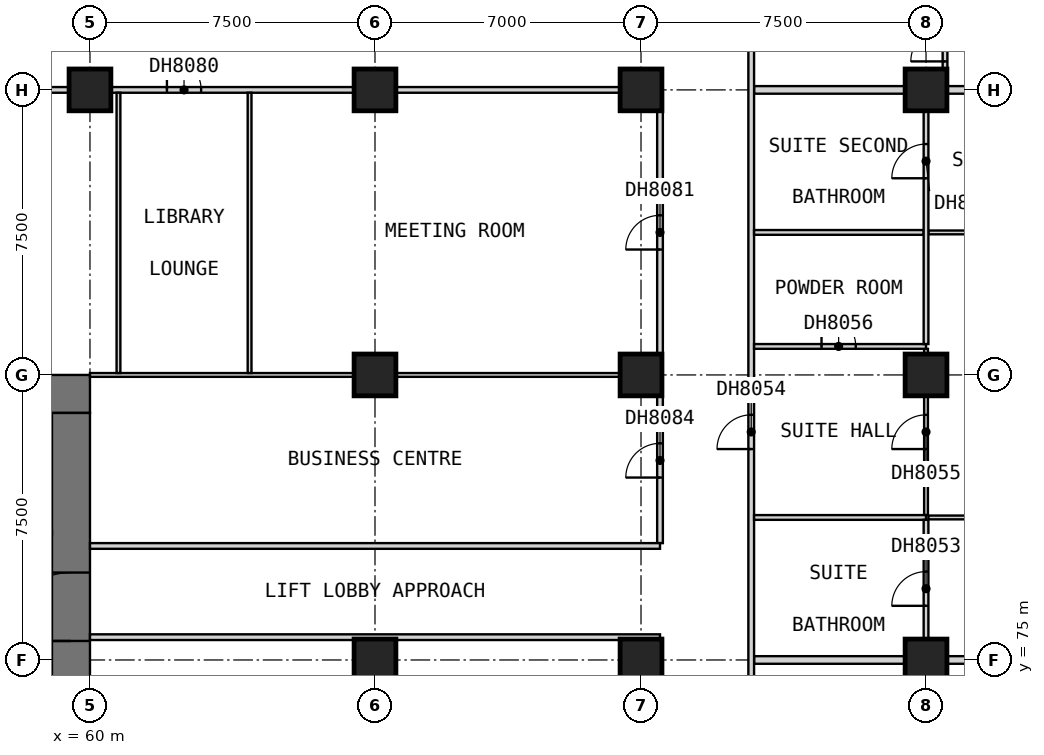
"""IFC4 building model, lengths in metres.
Left out: names, types, materials, properties, quantities, classifications, styles, units other than length and angle.
Written with IfcOpenShell. Run it as: python <this file> out.ifc"""

import sys

from ifc_helpers import new_model, si_unit, direction, frame, frame_2d, origin, origin_2d, place, context, subcontext, project, spatial, rectangle, extrude, element, fill, save


model = new_model("IFC4")
c1 = context("Model", 3, precision=1e-05, world=origin(), true_north=direction((0.0, 1.0)))
c2 = subcontext(c1, "Body", "Model", "MODEL_VIEW")
j1 = project(units=[si_unit("LENGTHUNIT", "METRE"), si_unit("PLANEANGLEUNIT", "RADIAN")], contexts=[c1])
p1 = place(None, origin())
s1 = spatial("IfcSite", under=j1, at=p1, CompositionType="ELEMENT")
p2 = place(p1, origin())
s2 = spatial("IfcBuilding", under=s1, at=p2, CompositionType="ELEMENT")
p3 = place(p2, frame((0.0, 0.0, 89.9)))
s3 = spatial("IfcBuildingStorey", under=s2, at=p3, CompositionType="ELEMENT", Elevation=89.9)
for number, where, z_axis, x_axis in (
    (1, (60.0, 90.0, 0.0), (0.0, 0.0, 1.0), (1.0, 0.0, 0.0)),
    (2, (67.5, 75.0, 0.0), (0.0, 0.0, 1.0), (1.0, 0.0, 0.0)),
    (3, (67.5, 82.5, 0.0), (0.0, 0.0, 1.0), (1.0, 0.0, 0.0)),
    (4, (67.5, 90.0, 0.0), (0.0, 0.0, 1.0), (1.0, 0.0, 0.0)),
    (5, (74.5, 75.0, 0.0), (0.0, 0.0, 1.0), (1.0, 0.0, 0.0)),
    (6, (74.5, 82.5, 0.0), (0.0, 0.0, 1.0), (1.0, 0.0, 0.0)),
    (7, (74.5, 90.0, 0.0), (0.0, 0.0, 1.0), (1.0, 0.0, 0.0)),
    (8, (82.0, 75.0, 0.0), (0.0, 0.0, 1.0), (1.0, 0.0, 0.0)),
    (9, (82.0, 82.5, 0.0), (0.0, 0.0, 1.0), (1.0, 0.0, 0.0)),
    (10, (82.0, 90.0, 0.0), (0.0, 0.0, 1.0), (1.0, 0.0, 0.0)),
):
    element("IfcColumn", number, at=place(p3, frame(where, z_axis=z_axis, x_axis=x_axis)), inside=s3, PredefinedType="COLUMN", context=c2, shape_type="SweptSolid", body=[
        extrude(rectangle(XDim=1.1, YDim=1.1, at=origin_2d()), origin(), (0.0, 0.0, 1.0), 3.6),
    ])
p4 = place(p3, frame((30.0, 82.0, 0.0), z_axis=(0.0, 0.0, 1.0), x_axis=(1.0, 0.0, 0.0)))
e11 = element("IfcWall", 11, at=p4, inside=s3, PredefinedType="SHEAR", context=c2, shape_type="SweptSolid", body=[
    extrude(rectangle(XDim=30.0, YDim=1.0, at=frame_2d((15.0, 0.0))), origin(), (0.0, 0.0, 1.0), 3.6),
])
p5 = place(p3, frame((59.5, 61.0, 0.0), z_axis=(0.0, 0.0, 1.0), x_axis=(0.0, 1.0, 0.0)))
e12 = element("IfcWall", 12, at=p5, inside=s3, PredefinedType="SHEAR", context=c2, shape_type="SweptSolid", body=[
    extrude(rectangle(XDim=20.5, YDim=1.0, at=frame_2d((10.25, 0.0))), origin(), (0.0, 0.0, 1.0), 3.6),
])
p6 = place(p5, frame((14.5, 0.0, 0.0)))
e13 = element("IfcOpeningElement", 13, at=p6, cuts=e12, PredefinedType="OPENING", context=c2, shape_type="SweptSolid", body=[
    extrude(rectangle(XDim=1.8, YDim=2.1, at=frame_2d((0.9, 1.05))), frame((0.0, 0.51, 0.0), z_axis=(0.0, -1.0, 0.0), x_axis=(1.0, 0.0, 0.0)), (0.0, 0.0, 1.0), 1.02),
])
for number, where, z_axis, x_axis in (
    (14, (77.475, 75.0, 0.0), (0.0, 0.0, 1.0), (1.0, 0.0, 0.0)),
    (15, (77.475, 90.0, 0.0), (0.0, 0.0, 1.0), (1.0, 0.0, 0.0)),
):
    element("IfcWall", number, at=place(p3, frame(where, z_axis=z_axis, x_axis=x_axis)), inside=s3, PredefinedType="PARTITIONING", context=c2, shape_type="SweptSolid", body=[
        extrude(rectangle(XDim=12.525, YDim=0.2, at=frame_2d((6.262, 0.0))), origin(), (0.0, 0.0, 1.0), 3.35),
    ])
p7 = place(p3, frame((33.75, 90.0, 0.0), z_axis=(0.0, 0.0, 1.0), x_axis=(1.0, 0.0, 0.0)))
e16 = element("IfcWall", 16, at=p7, inside=s3, PredefinedType="PARTITIONING", context=c2, shape_type="SweptSolid", body=[
    extrude(rectangle(XDim=41.25, YDim=0.15, at=frame_2d((20.625, 0.0))), origin(), (0.0, 0.0, 1.0), 3.35),
])
p8 = place(p7, frame((1.05, 0.0, 0.0)))
e17 = element("IfcOpeningElement", 17, at=p8, cuts=e16, PredefinedType="OPENING", context=c2, shape_type="SweptSolid", body=[
    extrude(rectangle(XDim=0.9, YDim=2.1, at=frame_2d((0.45, 1.05))), frame((0.0, 0.085, 0.0), z_axis=(0.0, -1.0, 0.0), x_axis=(1.0, 0.0, 0.0)), (0.0, 0.0, 1.0), 0.17),
])
p9 = place(p7, frame((14.55, 0.0, 0.0)))
e18 = element("IfcOpeningElement", 18, at=p9, cuts=e16, PredefinedType="OPENING", context=c2, shape_type="SweptSolid", body=[
    extrude(rectangle(XDim=0.9, YDim=2.1, at=frame_2d((0.45, 1.05))), frame((0.0, 0.085, 0.0), z_axis=(0.0, -1.0, 0.0), x_axis=(1.0, 0.0, 0.0)), (0.0, 0.0, 1.0), 0.17),
])
p10 = place(p7, frame((28.275, 0.0, 0.0)))
e19 = element("IfcOpeningElement", 19, at=p10, cuts=e16, PredefinedType="OPENING", context=c2, shape_type="SweptSolid", body=[
    extrude(rectangle(XDim=0.9, YDim=2.1, at=frame_2d((0.45, 1.05))), frame((0.0, 0.085, 0.0), z_axis=(0.0, -1.0, 0.0), x_axis=(1.0, 0.0, 0.0)), (0.0, 0.0, 1.0), 0.17),
])
p11 = place(p3, frame((75.0, 66.975, 0.0), z_axis=(0.0, 0.0, 1.0), x_axis=(0.0, 1.0, 0.0)))
e20 = element("IfcWall", 20, at=p11, inside=s3, PredefinedType="PARTITIONING", context=c2, shape_type="SweptSolid", body=[
    extrude(rectangle(XDim=8.55, YDim=0.15, at=frame_2d((4.275, 0.0))), origin(), (0.0, 0.0, 1.0), 3.35),
])
p12 = place(p11, frame((3.825, 0.0, 0.0)))
e21 = element("IfcOpeningElement", 21, at=p12, cuts=e20, PredefinedType="OPENING", context=c2, shape_type="SweptSolid", body=[
    extrude(rectangle(XDim=0.9, YDim=2.1, at=frame_2d((0.45, 1.05))), frame((0.0, 0.085, 0.0), z_axis=(0.0, -1.0, 0.0), x_axis=(1.0, 0.0, 0.0)), (0.0, 0.0, 1.0), 0.17),
])
p13 = place(p3, frame((75.0, 78.075, 0.0), z_axis=(0.0, 0.0, 1.0), x_axis=(0.0, 1.0, 0.0)))
e22 = element("IfcWall", 22, at=p13, inside=s3, PredefinedType="PARTITIONING", context=c2, shape_type="SweptSolid", body=[
    extrude(rectangle(XDim=11.85, YDim=0.15, at=frame_2d((5.925, 0.0))), origin(), (0.0, 0.0, 1.0), 3.35),
])
p14 = place(p13, frame((7.725, 0.0, 0.0)))
e23 = element("IfcOpeningElement", 23, at=p14, cuts=e22, PredefinedType="OPENING", context=c2, shape_type="SweptSolid", body=[
    extrude(rectangle(XDim=0.9, YDim=2.1, at=frame_2d((0.45, 1.05))), frame((0.0, 0.085, 0.0), z_axis=(0.0, -1.0, 0.0), x_axis=(1.0, 0.0, 0.0)), (0.0, 0.0, 1.0), 0.17),
])
p15 = place(p13, frame((1.725, 0.0, 0.0)))
e24 = element("IfcOpeningElement", 24, at=p15, cuts=e22, PredefinedType="OPENING", context=c2, shape_type="SweptSolid", body=[
    extrude(rectangle(XDim=0.9, YDim=2.1, at=frame_2d((0.45, 1.05))), frame((0.0, 0.085, 0.0), z_axis=(0.0, -1.0, 0.0), x_axis=(1.0, 0.0, 0.0)), (0.0, 0.0, 1.0), 0.17),
])
p16 = place(p3, frame((77.4, 50.175, 0.0), z_axis=(0.0, 0.0, 1.0), x_axis=(0.0, 1.0, 0.0)))
e25 = element("IfcWall", 25, at=p16, inside=s3, PredefinedType="PARTITIONING", context=c2, shape_type="SweptSolid", body=[
    extrude(rectangle(XDim=42.15, YDim=0.15, at=frame_2d((21.075, 0.0))), origin(), (0.0, 0.0, 1.0), 3.35),
])
p17 = place(p16, frame((7.875, 0.0, 0.0)))
e26 = element("IfcOpeningElement", 26, at=p17, cuts=e25, PredefinedType="OPENING", context=c2, shape_type="SweptSolid", body=[
    extrude(rectangle(XDim=0.9, YDim=2.1, at=frame_2d((0.45, 1.05))), frame((0.0, 0.085, 0.0), z_axis=(0.0, -1.0, 0.0), x_axis=(1.0, 0.0, 0.0)), (0.0, 0.0, 1.0), 0.17),
])
p18 = place(p16, frame((15.375, 0.0, 0.0)))
e27 = element("IfcOpeningElement", 27, at=p18, cuts=e25, PredefinedType="OPENING", context=c2, shape_type="SweptSolid", body=[
    extrude(rectangle(XDim=0.9, YDim=2.1, at=frame_2d((0.45, 1.05))), frame((0.0, 0.085, 0.0), z_axis=(0.0, -1.0, 0.0), x_axis=(1.0, 0.0, 0.0)), (0.0, 0.0, 1.0), 0.17),
])
p19 = place(p16, frame((30.375, 0.0, 0.0)))
e28 = element("IfcOpeningElement", 28, at=p19, cuts=e25, PredefinedType="OPENING", context=c2, shape_type="SweptSolid", body=[
    extrude(rectangle(XDim=0.9, YDim=2.1, at=frame_2d((0.45, 1.05))), frame((0.0, 0.085, 0.0), z_axis=(0.0, -1.0, 0.0), x_axis=(1.0, 0.0, 0.0)), (0.0, 0.0, 1.0), 0.17),
])
p20 = place(p3, frame((82.062, 78.75, 0.0), z_axis=(0.0, 0.0, 1.0), x_axis=(1.0, 0.0, 0.0)))
e29 = element("IfcWall", 29, at=p20, inside=s3, PredefinedType="PARTITIONING", context=c2, shape_type="SweptSolid", body=[
    extrude(rectangle(XDim=7.127, YDim=0.1, at=frame_2d((3.564, 0.0))), origin(), (0.0, 0.0, 1.0), 3.35),
])
p21 = place(p20, frame((3.488, 0.0, 0.0)))
e30 = element("IfcOpeningElement", 30, at=p21, cuts=e29, PredefinedType="OPENING", context=c2, shape_type="SweptSolid", body=[
    extrude(rectangle(XDim=0.9, YDim=2.1, at=frame_2d((0.45, 1.05))), frame((0.0, 0.06, 0.0), z_axis=(0.0, -1.0, 0.0), x_axis=(1.0, 0.0, 0.0)), (0.0, 0.0, 1.0), 0.12),
])
p22 = place(p3, frame((60.0, 82.5, 0.0), z_axis=(0.0, 0.0, 1.0), x_axis=(1.0, 0.0, 0.0)))
e31 = element("IfcWall", 31, at=p22, inside=s3, PredefinedType="PARTITIONING", context=c2, shape_type="SweptSolid", body=[
    extrude(rectangle(XDim=14.925, YDim=0.1, at=frame_2d((7.462, 0.0))), origin(), (0.0, 0.0, 1.0), 3.35),
])
p23 = place(p3, frame((82.062, 86.25, 0.0), z_axis=(0.0, 0.0, 1.0), x_axis=(1.0, 0.0, 0.0)))
e32 = element("IfcWall", 32, at=p23, inside=s3, PredefinedType="PARTITIONING", context=c2, shape_type="SweptSolid", body=[
    extrude(rectangle(XDim=7.127, YDim=0.1, at=frame_2d((3.564, 0.0))), origin(), (0.0, 0.0, 1.0), 3.35),
])
p24 = place(p23, frame((3.488, 0.0, 0.0)))
e33 = element("IfcOpeningElement", 33, at=p24, cuts=e32, PredefinedType="OPENING", context=c2, shape_type="SweptSolid", body=[
    extrude(rectangle(XDim=0.9, YDim=2.1, at=frame_2d((0.45, 1.05))), frame((0.0, 0.06, 0.0), z_axis=(0.0, -1.0, 0.0), x_axis=(1.0, 0.0, 0.0)), (0.0, 0.0, 1.0), 0.12),
])
for number, where, z_axis, x_axis in (
    (34, (60.75, 82.55, 0.0), (0.0, 0.0, 1.0), (0.0, 1.0, 0.0)),
    (35, (64.2, 82.55, 0.0), (0.0, 0.0, 1.0), (0.0, 1.0, 0.0)),
):
    element("IfcWall", number, at=place(p3, frame(where, z_axis=z_axis, x_axis=x_axis)), inside=s3, PredefinedType="PARTITIONING", context=c2, shape_type="SweptSolid", body=[
        extrude(rectangle(XDim=7.375, YDim=0.1, at=frame_2d((3.688, 0.0))), origin(), (0.0, 0.0, 1.0), 3.35),
    ])
p25 = place(p3, frame((82.0, 78.812, 0.0), z_axis=(0.0, 0.0, 1.0), x_axis=(0.0, 1.0, 0.0)))
e36 = element("IfcWall", 36, at=p25, inside=s3, PredefinedType="PARTITIONING", context=c2, shape_type="SweptSolid", body=[
    extrude(rectangle(XDim=4.375, YDim=0.1, at=frame_2d((2.188, 0.0))), origin(), (0.0, 0.0, 1.0), 3.35),
])
p26 = place(p25, frame((1.738, 0.0, 0.0)))
e37 = element("IfcOpeningElement", 37, at=p26, cuts=e36, PredefinedType="OPENING", context=c2, shape_type="SweptSolid", body=[
    extrude(rectangle(XDim=0.9, YDim=2.1, at=frame_2d((0.45, 1.05))), frame((0.0, 0.06, 0.0), z_axis=(0.0, -1.0, 0.0), x_axis=(1.0, 0.0, 0.0)), (0.0, 0.0, 1.0), 0.12),
])
p27 = place(p3, frame((77.475, 78.75, 0.0), z_axis=(0.0, 0.0, 1.0), x_axis=(1.0, 0.0, 0.0)))
e38 = element("IfcWall", 38, at=p27, inside=s3, PredefinedType="PARTITIONING", context=c2, shape_type="SweptSolid", body=[
    extrude(rectangle(XDim=4.525, YDim=0.125, at=frame_2d((2.262, 0.0))), origin(), (0.0, 0.0, 1.0), 3.35),
])
p28 = place(p3, frame((77.475, 83.25, 0.0), z_axis=(0.0, 0.0, 1.0), x_axis=(1.0, 0.0, 0.0)))
e39 = element("IfcWall", 39, at=p28, inside=s3, PredefinedType="PARTITIONING", context=c2, shape_type="SweptSolid", body=[
    extrude(rectangle(XDim=4.525, YDim=0.125, at=frame_2d((2.262, 0.0))), origin(), (0.0, 0.0, 1.0), 3.35),
])
p29 = place(p28, frame((1.775, 0.0, 0.0)))
e40 = element("IfcOpeningElement", 40, at=p29, cuts=e39, PredefinedType="OPENING", context=c2, shape_type="SweptSolid", body=[
    extrude(rectangle(XDim=0.9, YDim=2.1, at=frame_2d((0.45, 1.05))), frame((0.0, 0.073, 0.0), z_axis=(0.0, -1.0, 0.0), x_axis=(1.0, 0.0, 0.0)), (0.0, 0.0, 1.0), 0.145),
])
p30 = place(p3, frame((77.475, 86.25, 0.0), z_axis=(0.0, 0.0, 1.0), x_axis=(1.0, 0.0, 0.0)))
e41 = element("IfcWall", 41, at=p30, inside=s3, PredefinedType="PARTITIONING", context=c2, shape_type="SweptSolid", body=[
    extrude(rectangle(XDim=4.462, YDim=0.125, at=frame_2d((2.231, 0.0))), origin(), (0.0, 0.0, 1.0), 3.35),
])
p31 = place(p3, frame((82.0, 68.312, 0.0), z_axis=(0.0, 0.0, 1.0), x_axis=(0.0, 1.0, 0.0)))
e42 = element("IfcWall", 42, at=p31, inside=s3, PredefinedType="PARTITIONING", context=c2, shape_type="SweptSolid", body=[
    extrude(rectangle(XDim=10.375, YDim=0.125, at=frame_2d((5.188, 0.0))), origin(), (0.0, 0.0, 1.0), 3.35),
])
p32 = place(p31, frame((4.363, 0.0, 0.0)))
e43 = element("IfcOpeningElement", 43, at=p32, cuts=e42, PredefinedType="OPENING", context=c2, shape_type="SweptSolid", body=[
    extrude(rectangle(XDim=0.9, YDim=2.1, at=frame_2d((0.45, 1.05))), frame((0.0, 0.073, 0.0), z_axis=(0.0, -1.0, 0.0), x_axis=(1.0, 0.0, 0.0)), (0.0, 0.0, 1.0), 0.145),
])
p33 = place(p31, frame((8.113, 0.0, 0.0)))
e44 = element("IfcOpeningElement", 44, at=p33, cuts=e42, PredefinedType="OPENING", context=c2, shape_type="SweptSolid", body=[
    extrude(rectangle(XDim=0.9, YDim=2.1, at=frame_2d((0.45, 1.05))), frame((0.0, 0.073, 0.0), z_axis=(0.0, -1.0, 0.0), x_axis=(1.0, 0.0, 0.0)), (0.0, 0.0, 1.0), 0.145),
])
p34 = place(p3, frame((82.0, 83.312, 0.0), z_axis=(0.0, 0.0, 1.0), x_axis=(0.0, 1.0, 0.0)))
e45 = element("IfcWall", 45, at=p34, inside=s3, PredefinedType="PARTITIONING", context=c2, shape_type="SweptSolid", body=[
    extrude(rectangle(XDim=6.587, YDim=0.125, at=frame_2d((3.294, 0.0))), origin(), (0.0, 0.0, 1.0), 3.35),
])
p35 = place(p34, frame((4.363, 0.0, 0.0)))
e46 = element("IfcOpeningElement", 46, at=p35, cuts=e45, PredefinedType="OPENING", context=c2, shape_type="SweptSolid", body=[
    extrude(rectangle(XDim=0.9, YDim=2.1, at=frame_2d((0.45, 1.05))), frame((0.0, 0.073, 0.0), z_axis=(0.0, -1.0, 0.0), x_axis=(1.0, 0.0, 0.0)), (0.0, 0.0, 1.0), 0.145),
])
p36 = place(p3, frame((82.5, 90.1, 0.0), z_axis=(0.0, 0.0, 1.0), x_axis=(0.0, 1.0, 0.0)))
e47 = element("IfcWall", 47, at=p36, inside=s3, PredefinedType="PARTITIONING", context=c2, shape_type="SweptSolid", body=[
    extrude(rectangle(XDim=2.237, YDim=0.125, at=frame_2d((1.119, 0.0))), origin(), (0.0, 0.0, 1.0), 3.35),
])
p37 = place(p36, frame((0.65, 0.0, 0.0)))
e48 = element("IfcOpeningElement", 48, at=p37, cuts=e47, PredefinedType="OPENING", context=c2, shape_type="SweptSolid", body=[
    extrude(rectangle(XDim=0.9, YDim=2.1, at=frame_2d((0.45, 1.05))), frame((0.0, 0.073, 0.0), z_axis=(0.0, -1.0, 0.0), x_axis=(1.0, 0.0, 0.0)), (0.0, 0.0, 1.0), 0.145),
])
for number, where, z_axis, x_axis in (
    (49, (60.0, 75.6, 0.0), (0.0, 0.0, 1.0), (1.0, 0.0, 0.0)),
    (50, (60.0, 78.0, 0.0), (0.0, 0.0, 1.0), (1.0, 0.0, 0.0)),
):
    element("IfcWall", number, at=place(p3, frame(where, z_axis=z_axis, x_axis=x_axis)), inside=s3, PredefinedType="PARTITIONING", context=c2, shape_type="SweptSolid", body=[
        extrude(rectangle(XDim=15.0, YDim=0.15, at=frame_2d((7.5, 0.0))), origin(), (0.0, 0.0, 1.0), 3.35),
    ])
p38 = place(p6, origin())
e51 = element("IfcDoor", 51, at=p38, inside=s3, OperationType="DOUBLE_DOOR_SINGLE_SWING", PredefinedType="DOOR", context=c2, shape_type="SweptSolid", body=[
    extrude(rectangle(XDim=1.8, YDim=2.1, at=frame_2d((0.9, 1.05))), frame((0.0, 0.025, 0.0), z_axis=(0.0, -1.0, 0.0), x_axis=(1.0, 0.0, 0.0)), (0.0, 0.0, 1.0), 0.05),
])
fill(e13, e51)
p39 = place(p33, origin())
e52 = element("IfcDoor", 52, at=p39, inside=s3, OperationType="SINGLE_SWING_LEFT", PredefinedType="DOOR", context=c2, shape_type="SweptSolid", body=[
    extrude(rectangle(XDim=0.9, YDim=2.1, at=frame_2d((0.45, 1.05))), frame((0.0, 0.025, 0.0), z_axis=(0.0, -1.0, 0.0), x_axis=(1.0, 0.0, 0.0)), (0.0, 0.0, 1.0), 0.05),
])
fill(e44, e52)
p40 = place(p19, origin())
e53 = element("IfcDoor", 53, at=p40, inside=s3, OperationType="SINGLE_SWING_RIGHT", PredefinedType="DOOR", context=c2, shape_type="SweptSolid", body=[
    extrude(rectangle(XDim=0.9, YDim=2.1, at=frame_2d((0.45, 1.05))), frame((0.0, 0.025, 0.0), z_axis=(0.0, -1.0, 0.0), x_axis=(1.0, 0.0, 0.0)), (0.0, 0.0, 1.0), 0.05),
])
fill(e28, e53)
p41 = place(p26, origin())
e54 = element("IfcDoor", 54, at=p41, inside=s3, OperationType="SINGLE_SWING_LEFT", PredefinedType="DOOR", context=c2, shape_type="SweptSolid", body=[
    extrude(rectangle(XDim=0.9, YDim=2.1, at=frame_2d((0.45, 1.05))), frame((0.0, 0.025, 0.0), z_axis=(0.0, -1.0, 0.0), x_axis=(1.0, 0.0, 0.0)), (0.0, 0.0, 1.0), 0.05),
])
fill(e37, e54)
p42 = place(p29, origin())
e55 = element("IfcDoor", 55, at=p42, inside=s3, OperationType="SINGLE_SWING_RIGHT", PredefinedType="DOOR", context=c2, shape_type="SweptSolid", body=[
    extrude(rectangle(XDim=0.9, YDim=2.1, at=frame_2d((0.45, 1.05))), frame((0.0, 0.025, 0.0), z_axis=(0.0, -1.0, 0.0), x_axis=(1.0, 0.0, 0.0)), (0.0, 0.0, 1.0), 0.05),
])
fill(e40, e55)
p43 = place(p35, origin())
e56 = element("IfcDoor", 56, at=p43, inside=s3, OperationType="SINGLE_SWING_LEFT", PredefinedType="DOOR", context=c2, shape_type="SweptSolid", body=[
    extrude(rectangle(XDim=0.9, YDim=2.1, at=frame_2d((0.45, 1.05))), frame((0.0, 0.025, 0.0), z_axis=(0.0, -1.0, 0.0), x_axis=(1.0, 0.0, 0.0)), (0.0, 0.0, 1.0), 0.05),
])
fill(e46, e56)
p44 = place(p37, origin())
e57 = element("IfcDoor", 57, at=p44, inside=s3, OperationType="SINGLE_SWING_LEFT", PredefinedType="DOOR", context=c2, shape_type="SweptSolid", body=[
    extrude(rectangle(XDim=0.9, YDim=2.1, at=frame_2d((0.45, 1.05))), frame((0.0, 0.025, 0.0), z_axis=(0.0, -1.0, 0.0), x_axis=(1.0, 0.0, 0.0)), (0.0, 0.0, 1.0), 0.05),
])
fill(e48, e57)
p45 = place(p10, origin())
e58 = element("IfcDoor", 58, at=p45, inside=s3, OperationType="SINGLE_SWING_RIGHT", PredefinedType="DOOR", context=c2, shape_type="SweptSolid", body=[
    extrude(rectangle(XDim=0.9, YDim=2.1, at=frame_2d((0.45, 1.05))), frame((0.0, 0.025, 0.0), z_axis=(0.0, -1.0, 0.0), x_axis=(1.0, 0.0, 0.0)), (0.0, 0.0, 1.0), 0.05),
])
fill(e19, e58)
p46 = place(p14, origin())
e59 = element("IfcDoor", 59, at=p46, inside=s3, OperationType="SINGLE_SWING_LEFT", PredefinedType="DOOR", context=c2, shape_type="SweptSolid", body=[
    extrude(rectangle(XDim=0.9, YDim=2.1, at=frame_2d((0.45, 1.05))), frame((0.0, 0.025, 0.0), z_axis=(0.0, -1.0, 0.0), x_axis=(1.0, 0.0, 0.0)), (0.0, 0.0, 1.0), 0.05),
])
fill(e23, e59)
p47 = place(p15, origin())
e60 = element("IfcDoor", 60, at=p47, inside=s3, OperationType="SINGLE_SWING_LEFT", PredefinedType="DOOR", context=c2, shape_type="SweptSolid", body=[
    extrude(rectangle(XDim=0.9, YDim=2.1, at=frame_2d((0.45, 1.05))), frame((0.0, 0.025, 0.0), z_axis=(0.0, -1.0, 0.0), x_axis=(1.0, 0.0, 0.0)), (0.0, 0.0, 1.0), 0.05),
])
fill(e24, e60)
save(model, sys.argv[1])
